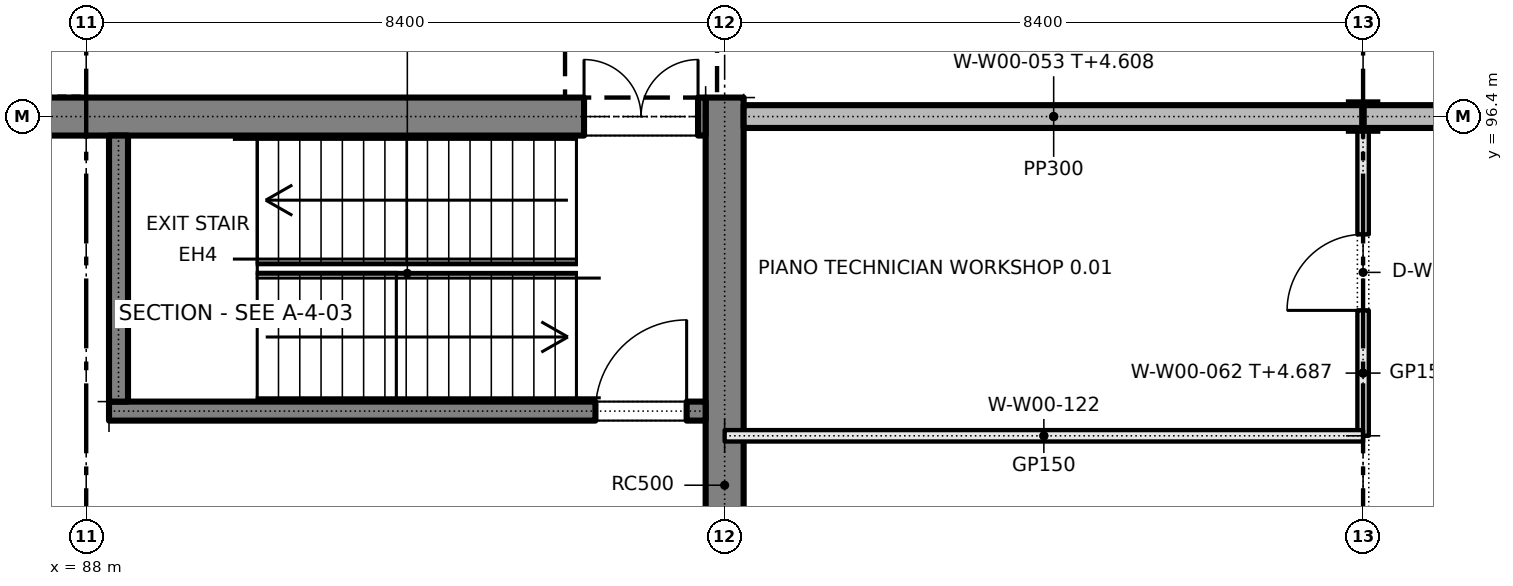
"""IFC4 building model, lengths in metres.
Left out: names, types, materials, properties, quantities, classifications, styles, units other than length and angle.
Written with IfcOpenShell. Run it as: python <this file> out.ifc"""

import sys

from ifc_helpers import new_model, si_unit, direction, frame, frame_2d, origin, origin_2d, place, context, subcontext, project, spatial, rectangle, i_section, extrude, element, fill, save


model = new_model("IFC4")
c1 = context("Model", 3, precision=1e-05, world=origin(), true_north=direction((0.0, 1.0)))
c2 = subcontext(c1, "Body", "Model", "MODEL_VIEW")
j1 = project(units=[si_unit("LENGTHUNIT", "METRE"), si_unit("PLANEANGLEUNIT", "RADIAN")], contexts=[c1])
p1 = place(None, origin())
s1 = spatial("IfcSite", under=j1, at=p1, CompositionType="ELEMENT")
p2 = place(p1, origin())
s2 = spatial("IfcBuilding", under=s1, at=p2, CompositionType="ELEMENT")
p3 = place(p2, origin())
s3 = spatial("IfcBuildingStorey", under=s2, at=p3, CompositionType="ELEMENT", Elevation=0.0)
p4 = place(p3, frame((96.4, 54.15, 0.0), z_axis=(0.0, 0.0, 1.0), x_axis=(0.0, 1.0, 0.0)))
e1 = element("IfcWall", 1, at=p4, inside=s3, PredefinedType="SOLIDWALL", context=c2, shape_type="SweptSolid", body=[
    extrude(rectangle(XDim=42.5, YDim=0.5, at=frame_2d((21.25, 0.0))), origin(), (0.0, 0.0, 1.0), 5.4),
])
p5 = place(p4, frame((8.35, 0.0, 0.0)))
e2 = element("IfcOpeningElement", 2, at=p5, cuts=e1, PredefinedType="OPENING", context=c2, shape_type="SweptSolid", body=[
    extrude(rectangle(XDim=1.8, YDim=2.1, at=frame_2d((0.9, 1.05))), frame((0.0, 0.26, 0.0), z_axis=(0.0, -1.0, 0.0), x_axis=(1.0, 0.0, 0.0)), (0.0, 0.0, 1.0), 0.52),
])
p6 = place(p4, frame((19.75, 0.0, 0.0)))
e3 = element("IfcOpeningElement", 3, at=p6, cuts=e1, PredefinedType="OPENING", context=c2, shape_type="SweptSolid", body=[
    extrude(rectangle(XDim=3.0, YDim=2.1, at=frame_2d((1.5, 1.05))), frame((0.0, 0.26, 0.0), z_axis=(0.0, -1.0, 0.0), x_axis=(1.0, 0.0, 0.0)), (0.0, 0.0, 1.0), 0.52),
])
p7 = place(p4, frame((32.35, 0.0, 0.0)))
e4 = element("IfcOpeningElement", 4, at=p7, cuts=e1, PredefinedType="OPENING", context=c2, shape_type="SweptSolid", body=[
    extrude(rectangle(XDim=1.8, YDim=2.1, at=frame_2d((0.9, 1.05))), frame((0.0, 0.26, 0.0), z_axis=(0.0, -1.0, 0.0), x_axis=(1.0, 0.0, 0.0)), (0.0, 0.0, 1.0), 0.52),
])
p8 = place(p3, frame((29.45, 96.4, 0.0), z_axis=(0.0, 0.0, 1.0), x_axis=(1.0, 0.0, 0.0)))
e5 = element("IfcWall", 5, at=p8, inside=s3, PredefinedType="SOLIDWALL", context=c2, shape_type="SweptSolid", body=[
    extrude(rectangle(XDim=66.7, YDim=0.5, at=frame_2d((33.35, 0.0))), origin(), (0.0, 0.0, 1.0), 5.4),
])
p9 = place(p8, frame((11.75, 0.0, 0.9)))
e6 = element("IfcOpeningElement", 6, at=p9, cuts=e5, PredefinedType="OPENING", context=c2, shape_type="SweptSolid", body=[
    extrude(rectangle(XDim=1.2, YDim=3.6, at=frame_2d((0.6, 1.8))), frame((0.0, 0.26, 0.0), z_axis=(0.0, -1.0, 0.0), x_axis=(1.0, 0.0, 0.0)), (0.0, 0.0, 1.0), 0.52),
])
p10 = place(p8, frame((20.15, 0.0, 0.9)))
e7 = element("IfcOpeningElement", 7, at=p10, cuts=e5, PredefinedType="OPENING", context=c2, shape_type="SweptSolid", body=[
    extrude(rectangle(XDim=1.2, YDim=3.6, at=frame_2d((0.6, 1.8))), frame((0.0, 0.26, 0.0), z_axis=(0.0, -1.0, 0.0), x_axis=(1.0, 0.0, 0.0)), (0.0, 0.0, 1.0), 0.52),
])
p11 = place(p8, frame((28.55, 0.0, 0.9)))
e8 = element("IfcOpeningElement", 8, at=p11, cuts=e5, PredefinedType="OPENING", context=c2, shape_type="SweptSolid", body=[
    extrude(rectangle(XDim=1.2, YDim=3.6, at=frame_2d((0.6, 1.8))), frame((0.0, 0.26, 0.0), z_axis=(0.0, -1.0, 0.0), x_axis=(1.0, 0.0, 0.0)), (0.0, 0.0, 1.0), 0.52),
])
p12 = place(p8, frame((36.95, 0.0, 0.9)))
e9 = element("IfcOpeningElement", 9, at=p12, cuts=e5, PredefinedType="OPENING", context=c2, shape_type="SweptSolid", body=[
    extrude(rectangle(XDim=1.2, YDim=3.6, at=frame_2d((0.6, 1.8))), frame((0.0, 0.26, 0.0), z_axis=(0.0, -1.0, 0.0), x_axis=(1.0, 0.0, 0.0)), (0.0, 0.0, 1.0), 0.52),
])
p13 = place(p8, frame((45.35, 0.0, 0.9)))
e10 = element("IfcOpeningElement", 10, at=p13, cuts=e5, PredefinedType="OPENING", context=c2, shape_type="SweptSolid", body=[
    extrude(rectangle(XDim=1.2, YDim=3.6, at=frame_2d((0.6, 1.8))), frame((0.0, 0.26, 0.0), z_axis=(0.0, -1.0, 0.0), x_axis=(1.0, 0.0, 0.0)), (0.0, 0.0, 1.0), 0.52),
])
p14 = place(p8, frame((53.75, 0.0, 0.9)))
e11 = element("IfcOpeningElement", 11, at=p14, cuts=e5, PredefinedType="OPENING", context=c2, shape_type="SweptSolid", body=[
    extrude(rectangle(XDim=1.2, YDim=3.6, at=frame_2d((0.6, 1.8))), frame((0.0, 0.26, 0.0), z_axis=(0.0, -1.0, 0.0), x_axis=(1.0, 0.0, 0.0)), (0.0, 0.0, 1.0), 0.52),
])
p15 = place(p8, frame((6.0, 0.0, 0.0)))
e12 = element("IfcOpeningElement", 12, at=p15, cuts=e5, PredefinedType="OPENING", context=c2, shape_type="SweptSolid", body=[
    extrude(rectangle(XDim=1.5, YDim=2.1, at=frame_2d((0.75, 1.05))), frame((0.0, 0.26, 0.0), z_axis=(0.0, -1.0, 0.0), x_axis=(1.0, 0.0, 0.0)), (0.0, 0.0, 1.0), 0.52),
])
p16 = place(p8, frame((65.1, 0.0, 0.0)))
e13 = element("IfcOpeningElement", 13, at=p16, cuts=e5, PredefinedType="OPENING", context=c2, shape_type="SweptSolid", body=[
    extrude(rectangle(XDim=1.5, YDim=2.1, at=frame_2d((0.75, 1.05))), frame((0.0, 0.26, 0.0), z_axis=(0.0, -1.0, 0.0), x_axis=(1.0, 0.0, 0.0)), (0.0, 0.0, 1.0), 0.52),
])
p17 = place(p3, frame((88.3, 92.525, 0.0), z_axis=(0.0, 0.0, 1.0), x_axis=(1.0, 0.0, 0.0)))
e14 = element("IfcWall", 14, at=p17, inside=s3, PredefinedType="SOLIDWALL", context=c2, shape_type="SweptSolid", body=[
    extrude(rectangle(XDim=7.85, YDim=0.25, at=frame_2d((3.925, 0.0))), origin(), (0.0, 0.0, 1.0), 5.4),
])
p18 = place(p17, frame((6.4, 0.0, 0.0)))
e15 = element("IfcOpeningElement", 15, at=p18, cuts=e14, PredefinedType="OPENING", context=c2, shape_type="SweptSolid", body=[
    extrude(rectangle(XDim=1.2, YDim=2.1, at=frame_2d((0.6, 1.05))), frame((0.0, 0.135, 0.0), z_axis=(0.0, -1.0, 0.0), x_axis=(1.0, 0.0, 0.0)), (0.0, 0.0, 1.0), 0.27),
])
p19 = place(p3, frame((88.425, 92.65, 0.0), z_axis=(0.0, 0.0, 1.0), x_axis=(0.0, 1.0, 0.0)))
e16 = element("IfcWall", 16, at=p19, inside=s3, PredefinedType="SOLIDWALL", context=c2, shape_type="SweptSolid", body=[
    extrude(rectangle(XDim=3.5, YDim=0.25, at=frame_2d((1.75, 0.0))), origin(), (0.0, 0.0, 1.0), 5.4),
])
p20 = place(p3, frame((104.8, 96.4, 0.0), z_axis=(0.0, 0.0, 1.0), x_axis=(1.0, 0.0, 0.0)))
e17 = element("IfcColumn", 17, at=p20, inside=s3, PredefinedType="COLUMN", context=c2, shape_type="SweptSolid", body=[
    extrude(i_section(OverallWidth=0.373, OverallDepth=0.373, WebThickness=0.016, FlangeThickness=0.026, FilletRadius=0.015, at=origin_2d()), origin(), (0.0, 0.0, 1.0), 5.4),
])
p21 = place(p3, frame((96.4, 54.17, -0.3), z_axis=(0.0, 0.0, 1.0), x_axis=(0.0, 1.0, 0.0)))
e18 = element("IfcWall", 18, at=p21, inside=s3, PredefinedType="SOLIDWALL", context=c2, shape_type="SweptSolid", body=[
    extrude(rectangle(XDim=42.46, YDim=0.5, at=frame_2d((21.23, 0.0))), origin(), (0.0, 0.0, 1.0), 0.3),
])
p22 = place(p3, frame((29.45, 96.4, -0.5), z_axis=(0.0, 0.0, 1.0), x_axis=(1.0, 0.0, 0.0)))
e19 = element("IfcWall", 19, at=p22, inside=s3, PredefinedType="SOLIDWALL", context=c2, shape_type="SweptSolid", body=[
    extrude(rectangle(XDim=66.7, YDim=0.5, at=frame_2d((33.35, 0.0))), origin(), (0.0, 0.0, 1.0), 0.5),
])
p23 = place(p3, frame((88.32, 92.525, -0.5), z_axis=(0.0, 0.0, 1.0), x_axis=(1.0, 0.0, 0.0)))
e20 = element("IfcWall", 20, at=p23, inside=s3, PredefinedType="SOLIDWALL", context=c2, shape_type="SweptSolid", body=[
    extrude(rectangle(XDim=7.83, YDim=0.25, at=frame_2d((3.915, 0.0))), origin(), (0.0, 0.0, 1.0), 0.5),
])
p24 = place(p3, frame((88.425, 92.65, -0.5), z_axis=(0.0, 0.0, 1.0), x_axis=(0.0, 1.0, 0.0)))
e21 = element("IfcWall", 21, at=p24, inside=s3, PredefinedType="SOLIDWALL", context=c2, shape_type="SweptSolid", body=[
    extrude(rectangle(XDim=0.695, YDim=0.25, at=frame_2d((0.348, 0.0))), origin(), (0.0, 0.0, 1.0), 0.5),
])
p25 = place(p3, frame((88.425, 93.345, -0.5), z_axis=(0.0, 0.0, 1.0), x_axis=(0.0, 1.0, 0.0)))
e22 = element("IfcWall", 22, at=p25, inside=s3, PredefinedType="SOLIDWALL", context=c2, shape_type="SweptSolid", body=[
    extrude(rectangle(XDim=2.805, YDim=0.25, at=frame_2d((1.402, 0.0))), origin(), (0.0, 0.0, 1.0), 0.5),
])
p26 = place(p3, frame((96.65, 96.4, 0.0), z_axis=(0.0, 0.0, 1.0), x_axis=(1.0, 0.0, 0.0)))
e23 = element("IfcWall", 23, at=p26, inside=s3, PredefinedType="SOLIDWALL", context=c2, shape_type="SweptSolid", body=[
    extrude(rectangle(XDim=8.158, YDim=0.3, at=frame_2d((4.079, 0.0))), origin(), (0.0, 0.0, 1.0), 4.608),
])
p27 = place(p3, frame((104.792, 96.4, 0.0), z_axis=(0.0, 0.0, 1.0), x_axis=(1.0, 0.0, 0.0)))
e24 = element("IfcWall", 24, at=p27, inside=s3, PredefinedType="SOLIDWALL", context=c2, shape_type="SweptSolid", body=[
    extrude(rectangle(XDim=8.4, YDim=0.3, at=frame_2d((4.2, 0.0))), origin(), (0.0, 0.0, 1.0), 4.608),
])
p28 = place(p3, frame((104.8, 92.2, 0.0), z_axis=(0.0, 0.0, 1.0), x_axis=(0.0, 1.0, 0.0)))
e25 = element("IfcWall", 25, at=p28, inside=s3, PredefinedType="PARTITIONING", context=c2, shape_type="SweptSolid", body=[
    extrude(rectangle(XDim=4.013, YDim=0.15, at=frame_2d((2.007, 0.0))), origin(), (0.0, 0.0, 1.0), 4.687),
])
p29 = place(p28, frame((1.65, 0.0, 0.0)))
e26 = element("IfcOpeningElement", 26, at=p29, cuts=e25, PredefinedType="OPENING", context=c2, shape_type="SweptSolid", body=[
    extrude(rectangle(XDim=1.0, YDim=2.1, at=frame_2d((0.5, 1.05))), frame((0.0, 0.085, 0.0), z_axis=(0.0, -1.0, 0.0), x_axis=(1.0, 0.0, 0.0)), (0.0, 0.0, 1.0), 0.17),
])
p30 = place(p3, frame((96.4, 92.2, 0.0), z_axis=(0.0, 0.0, 1.0), x_axis=(1.0, 0.0, 0.0)))
e27 = element("IfcWall", 27, at=p30, inside=s3, PredefinedType="PARTITIONING", context=c2, shape_type="SweptSolid", body=[
    extrude(rectangle(XDim=8.4, YDim=0.15, at=frame_2d((4.2, 0.0))), origin(), (0.0, 0.0, 1.0), 5.4),
])
p31 = place(p18, origin())
e28 = element("IfcDoor", 28, at=p31, inside=s3, OperationType="SINGLE_SWING_RIGHT", PredefinedType="DOOR", context=c2, shape_type="SweptSolid", body=[
    extrude(rectangle(XDim=1.2, YDim=2.1, at=frame_2d((0.6, 1.05))), frame((0.0, 0.025, 0.0), z_axis=(0.0, -1.0, 0.0), x_axis=(1.0, 0.0, 0.0)), (0.0, 0.0, 1.0), 0.05),
])
fill(e15, e28)
p32 = place(p16, origin())
e29 = element("IfcDoor", 29, at=p32, inside=s3, OperationType="DOUBLE_DOOR_SINGLE_SWING", PredefinedType="DOOR", context=c2, shape_type="SweptSolid", body=[
    extrude(rectangle(XDim=1.5, YDim=2.1, at=frame_2d((0.75, 1.05))), frame((0.0, 0.025, 0.0), z_axis=(0.0, -1.0, 0.0), x_axis=(1.0, 0.0, 0.0)), (0.0, 0.0, 1.0), 0.05),
])
fill(e13, e29)
p33 = place(p29, origin())
e30 = element("IfcDoor", 30, at=p33, inside=s3, OperationType="SINGLE_SWING_LEFT", PredefinedType="DOOR", context=c2, shape_type="SweptSolid", body=[
    extrude(rectangle(XDim=1.0, YDim=2.1, at=frame_2d((0.5, 1.05))), frame((0.0, 0.025, 0.0), z_axis=(0.0, -1.0, 0.0), x_axis=(1.0, 0.0, 0.0)), (0.0, 0.0, 1.0), 0.05),
])
fill(e26, e30)
save(model, sys.argv[1])
